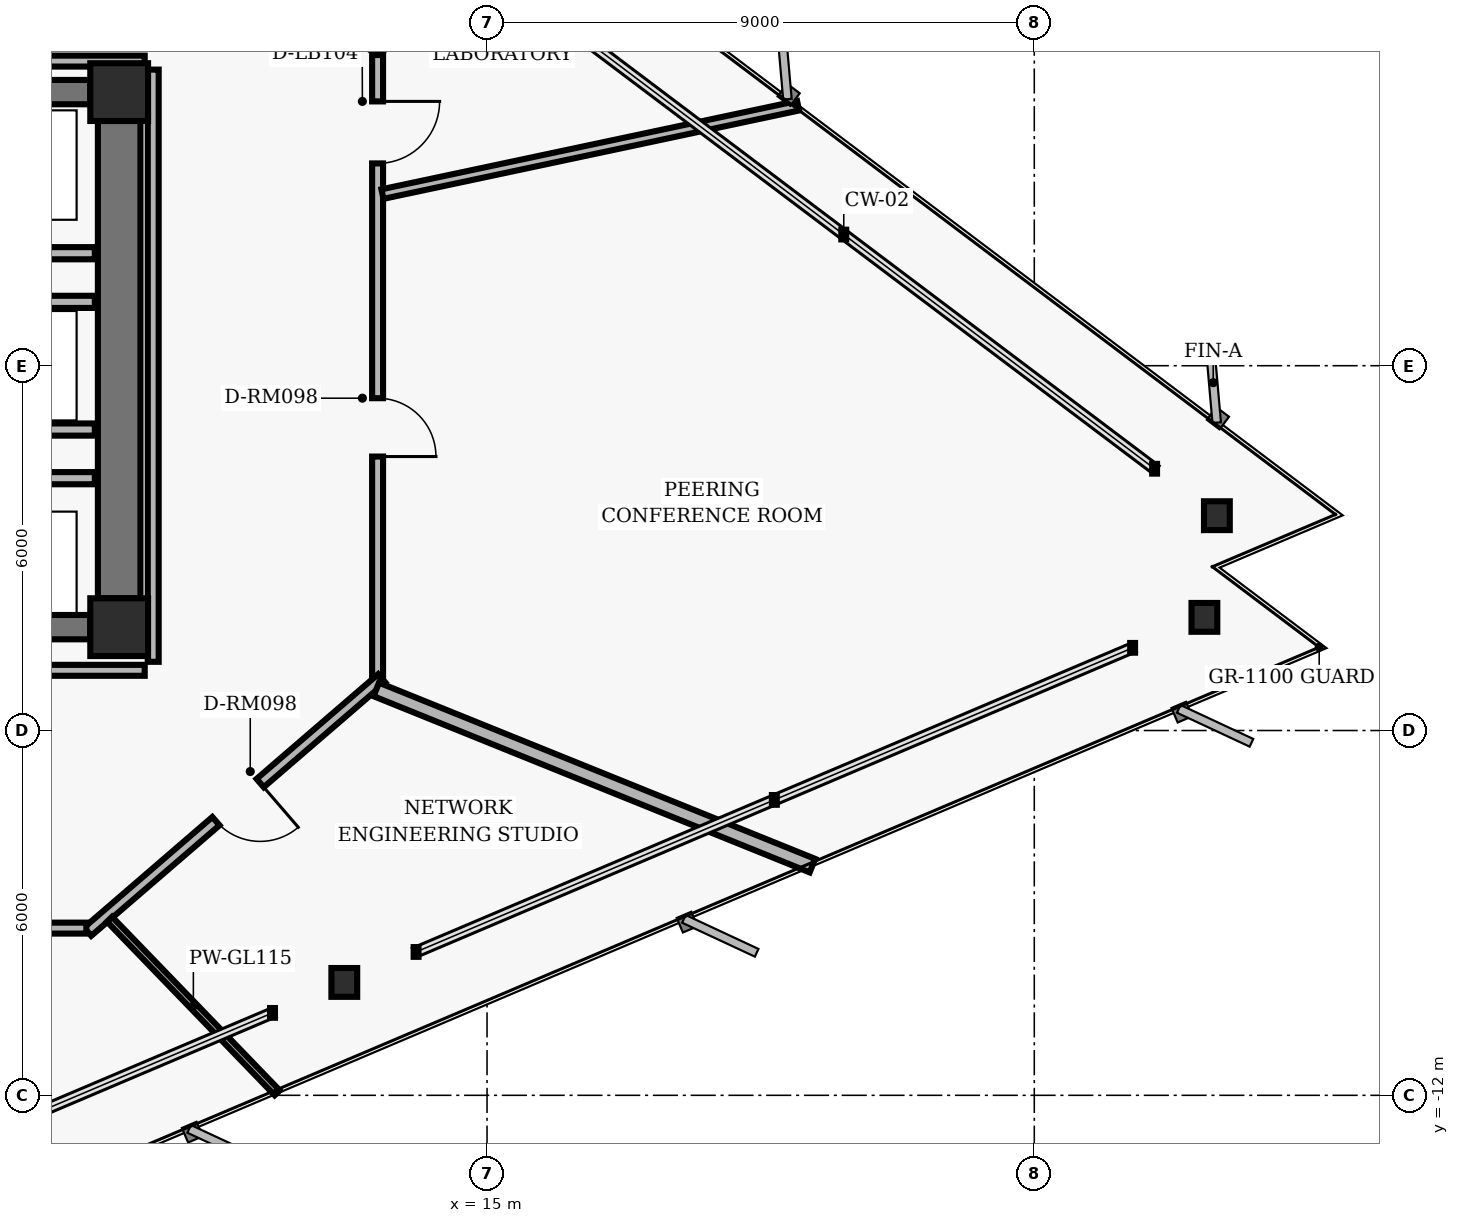
"""IFC4 building model, lengths in metres.
Left out: names, types, materials, properties, quantities, classifications, styles, units other than length and angle.
Written with IfcOpenShell. Run it as: python <this file> out.ifc"""

import sys

from ifc_helpers import new_model, si_unit, direction, frame, frame_2d, origin, origin_2d, place, context, subcontext, project, spatial, rectangle, hollow_rectangle, i_section, extrude, element, fill, save


model = new_model("IFC4")
c1 = context("Model", 3, precision=1e-05, world=origin(), true_north=direction((0.0, 1.0)))
c2 = subcontext(c1, "Body", "Model", "MODEL_VIEW")
j1 = project(units=[si_unit("LENGTHUNIT", "METRE"), si_unit("PLANEANGLEUNIT", "RADIAN")], contexts=[c1])
p1 = place(None, origin())
s1 = spatial("IfcSite", under=j1, at=p1, CompositionType="ELEMENT")
p2 = place(p1, origin())
s2 = spatial("IfcBuilding", under=s1, at=p2, CompositionType="ELEMENT")
p3 = place(p2, frame((0.0, 0.0, 56.32)))
s3 = spatial("IfcBuildingStorey", under=s2, at=p3, CompositionType="ELEMENT", Elevation=56.32)
for number, where, z_axis, x_axis in (
    (1, (8.95, 4.5, 0.0), (0.0, 0.0, 1.0), (1.0, 0.0, 0.0)),
    (2, (8.95, -4.3, 0.0), (0.0, 0.0, 1.0), (1.0, 0.0, 0.0)),
):
    element("IfcColumn", number, at=place(p3, frame(where, z_axis=z_axis, x_axis=x_axis)), inside=s3, PredefinedType="COLUMN", context=c2, shape_type="SweptSolid", body=[
        extrude(hollow_rectangle(XDim=0.95, YDim=0.95, WallThickness=0.06, InnerFilletRadius=0.02, OuterFilletRadius=0.04, at=origin_2d()), origin(), (0.0, 0.0, 1.0), 3.36),
    ])
p4 = place(p3, frame((8.95, -3.825, 0.0), z_axis=(0.0, 0.0, 1.0), x_axis=(0.0, 1.0, 0.0)))
e3 = element("IfcWall", 3, at=p4, inside=s3, PredefinedType="SHEAR", context=c2, shape_type="SweptSolid", body=[
    extrude(rectangle(XDim=7.85, YDim=0.7, at=frame_2d((3.925, 0.0))), origin(), (0.0, 0.0, 1.0), 3.098),
])
for number, where, z_axis, x_axis in (
    (4, (6.525, 4.5, 0.0), (0.0, 0.0, 1.0), (1.0, 0.0, 0.0)),
    (5, (6.525, -4.3, 0.0), (0.0, 0.0, 1.0), (1.0, 0.0, 0.0)),
):
    element("IfcWall", number, at=place(p3, frame(where, z_axis=z_axis, x_axis=x_axis)), inside=s3, PredefinedType="SHEAR", context=c2, shape_type="SweptSolid", body=[
        extrude(rectangle(XDim=1.95, YDim=0.4, at=frame_2d((0.975, 0.0))), origin(), (0.0, 0.0, 1.0), 3.098),
    ])
for number, where, z_axis, x_axis in (
    (6, (27.003, -2.467, 0.0), (0.0, 0.0, 1.0), (1.0, 0.0, 0.0)),
    (7, (12.653, -10.143, 0.0), (0.0, 0.0, 1.0), (1.0, 0.0, 0.0)),
    (8, (26.798, -4.139, 0.0), (0.0, 0.0, 1.0), (1.0, 0.0, 0.0)),
):
    element("IfcColumn", number, at=place(p3, frame(where, z_axis=z_axis, x_axis=x_axis)), inside=s3, PredefinedType="COLUMN", context=c2, shape_type="SweptSolid", body=[
        extrude(i_section(OverallWidth=0.424, OverallDepth=0.474, WebThickness=0.048, FlangeThickness=0.077, FilletRadius=0.025, at=origin_2d()), origin(), (0.0, 0.0, 1.0), 3.36),
    ])
for number, where, z_axis, x_axis in (
    (9, (6.45, -1.85, 0.0), (0.0, 0.0, 1.0), (1.0, 0.0, 0.0)),
    (10, (6.45, 1.85, 0.0), (0.0, 0.0, 1.0), (1.0, 0.0, 0.0)),
):
    element("IfcWall", number, at=place(p3, frame(where, z_axis=z_axis, x_axis=x_axis)), inside=s3, PredefinedType="PARTITIONING", context=c2, shape_type="SweptSolid", body=[
        extrude(rectangle(XDim=2.1, YDim=0.2, at=frame_2d((1.05, 0.0))), origin(), (0.0, 0.0, 1.0), 3.073),
    ])
for number, where, z_axis, x_axis in (
    (11, (6.64, -1.05, 0.0), (0.0, 0.0, 1.0), (1.0, 0.0, 0.0)),
    (12, (6.64, 1.05, 0.0), (0.0, 0.0, 1.0), (1.0, 0.0, 0.0)),
):
    element("IfcWall", number, at=place(p3, frame(where, z_axis=z_axis, x_axis=x_axis)), inside=s3, PredefinedType="PARTITIONING", context=c2, shape_type="SweptSolid", body=[
        extrude(rectangle(XDim=1.91, YDim=0.2, at=frame_2d((0.955, 0.0))), origin(), (0.0, 0.0, 1.0), 3.073),
    ])
p5 = place(p3, frame((8.567, 9.29, 0.0), z_axis=(0.0, 0.0, 1.0), x_axis=(0.749626463267, -0.66186113768, 0.0)))
e13 = element("IfcWall", 13, at=p5, inside=s3, PredefinedType="PARTITIONING", context=c2, shape_type="SweptSolid", body=[
    extrude(rectangle(XDim=6.27, YDim=0.18, at=frame_2d((3.135, 0.0))), origin(), (0.0, 0.0, 1.0), 2.587),
])
p6 = place(p5, frame((2.655, 0.0, 0.0)))
e14 = element("IfcOpeningElement", 14, at=p6, cuts=e13, PredefinedType="OPENING", context=c2, shape_type="SweptSolid", body=[
    extrude(rectangle(XDim=0.96, YDim=2.02, at=frame_2d((0.48, 1.01))), frame((0.0, 0.1, 0.0), z_axis=(0.0, -1.0, 0.0), x_axis=(1.0, 0.0, 0.0)), (0.0, 0.0, 1.0), 0.2),
])
p7 = place(p3, frame((13.2, 5.11, 0.0), z_axis=(0.0, 0.0, 1.0), x_axis=(0.0, -1.0, 0.0)))
e15 = element("IfcWall", 15, at=p7, inside=s3, PredefinedType="PARTITIONING", context=c2, shape_type="SweptSolid", body=[
    extrude(rectangle(XDim=10.22, YDim=0.18, at=frame_2d((5.11, 0.0))), origin(), (0.0, 0.0, 1.0), 3.073),
])
p8 = place(p7, frame((5.644, 0.0, 0.0)))
e16 = element("IfcOpeningElement", 16, at=p8, cuts=e15, PredefinedType="OPENING", context=c2, shape_type="SweptSolid", body=[
    extrude(rectangle(XDim=0.96, YDim=2.02, at=frame_2d((0.48, 1.01))), frame((0.0, 0.1, 0.0), z_axis=(0.0, -1.0, 0.0), x_axis=(1.0, 0.0, 0.0)), (0.0, 0.0, 1.0), 0.2),
])
p9 = place(p7, frame((0.763, 0.0, 0.0)))
e17 = element("IfcOpeningElement", 17, at=p9, cuts=e15, PredefinedType="OPENING", context=c2, shape_type="SweptSolid", body=[
    extrude(rectangle(XDim=1.02, YDim=2.02, at=frame_2d((0.51, 1.01))), frame((0.0, 0.1, 0.0), z_axis=(0.0, -1.0, 0.0), x_axis=(1.0, 0.0, 0.0)), (0.0, 0.0, 1.0), 0.2),
])
p10 = place(p3, frame((13.268, -5.141, 0.0), z_axis=(0.0, 0.0, 1.0), x_axis=(-0.757534501725, -0.65279512766, 0.0)))
e18 = element("IfcWall", 18, at=p10, inside=s3, PredefinedType="PARTITIONING", context=c2, shape_type="SweptSolid", body=[
    extrude(rectangle(XDim=6.385, YDim=0.18, at=frame_2d((3.192, 0.0))), origin(), (0.0, 0.0, 1.0), 3.073),
])
p11 = place(p10, frame((2.639, 0.0, 0.0)))
e19 = element("IfcOpeningElement", 19, at=p11, cuts=e18, PredefinedType="OPENING", context=c2, shape_type="SweptSolid", body=[
    extrude(rectangle(XDim=0.96, YDim=2.02, at=frame_2d((0.48, 1.01))), frame((0.0, 0.1, 0.0), z_axis=(0.0, -1.0, 0.0), x_axis=(1.0, 0.0, 0.0)), (0.0, 0.0, 1.0), 0.2),
])
p12 = place(p3, frame((8.41, -9.25, 0.0), z_axis=(0.0, 0.0, 1.0), x_axis=(-1.0, 0.0, 0.0)))
e20 = element("IfcWall", 20, at=p12, inside=s3, PredefinedType="PARTITIONING", context=c2, shape_type="SweptSolid", body=[
    extrude(rectangle(XDim=17.0, YDim=0.18, at=frame_2d((8.5, 0.0))), origin(), (0.0, 0.0, 1.0), 2.587),
])
p13 = place(p12, frame((5.34, 0.0, 0.0)))
e21 = element("IfcOpeningElement", 21, at=p13, cuts=e20, PredefinedType="OPENING", context=c2, shape_type="SweptSolid", body=[
    extrude(rectangle(XDim=1.02, YDim=2.02, at=frame_2d((0.51, 1.01))), frame((0.0, 0.1, 0.0), z_axis=(0.0, -1.0, 0.0), x_axis=(1.0, 0.0, 0.0)), (0.0, 0.0, 1.0), 0.2),
])
p14 = place(p3, frame((6.03, -5.01, 0.0), z_axis=(0.0, 0.0, 1.0), x_axis=(1.0, 0.0, 0.0)))
e22 = element("IfcWall", 22, at=p14, inside=s3, PredefinedType="PARTITIONING", context=c2, shape_type="SweptSolid", body=[
    extrude(rectangle(XDim=3.34, YDim=0.18, at=frame_2d((1.67, 0.0))), origin(), (0.0, 0.0, 1.0), 3.073),
])
p15 = place(p3, frame((9.51, -4.87, 0.0), z_axis=(0.0, 0.0, 1.0), x_axis=(0.0, 1.0, 0.0)))
e23 = element("IfcWall", 23, at=p15, inside=s3, PredefinedType="PARTITIONING", context=c2, shape_type="SweptSolid", body=[
    extrude(rectangle(XDim=9.74, YDim=0.18, at=frame_2d((4.87, 0.0))), origin(), (0.0, 0.0, 1.0), 3.073),
])
p16 = place(p3, frame((9.37, 5.01, 0.0), z_axis=(0.0, 0.0, 1.0), x_axis=(-1.0, 0.0, 0.0)))
e24 = element("IfcWall", 24, at=p16, inside=s3, PredefinedType="PARTITIONING", context=c2, shape_type="SweptSolid", body=[
    extrude(rectangle(XDim=2.808, YDim=0.18, at=frame_2d((1.404, 0.0))), origin(), (0.0, 0.0, 1.0), 3.073),
])
p17 = place(p3, frame((8.792, -9.104, 0.0), z_axis=(0.0, 0.0, 1.0), x_axis=(0.694664773763, -0.719333616685, 0.0)))
e25 = element("IfcWall", 25, at=p17, inside=s3, PredefinedType="MOVABLE", context=c2, shape_type="SweptSolid", body=[
    extrude(rectangle(XDim=3.969, YDim=0.115, at=frame_2d((1.984, 0.0))), origin(), (0.0, 0.0, 1.0), 3.073),
])
p18 = place(p3, frame((13.178, -5.324, 0.0), z_axis=(0.0, 0.0, 1.0), x_axis=(0.927191467136, -0.374587751094, 0.0)))
e26 = element("IfcWall", 26, at=p18, inside=s3, PredefinedType="PARTITIONING", context=c2, shape_type="SweptSolid", body=[
    extrude(rectangle(XDim=7.736, YDim=0.24, at=frame_2d((3.868, 0.0))), origin(), (0.0, 0.0, 1.0), 3.073),
])
p19 = place(p3, frame((13.28, 2.823, 0.0), z_axis=(0.0, 0.0, 1.0), x_axis=(0.978150237712, 0.207899284425, 0.0)))
e27 = element("IfcWall", 27, at=p19, inside=s3, PredefinedType="PARTITIONING", context=c2, shape_type="SweptSolid", body=[
    extrude(rectangle(XDim=6.988, YDim=0.16, at=frame_2d((3.494, 0.0))), origin(), (0.0, 0.0, 1.0), 3.073),
])
p20 = place(p11, origin())
e28 = element("IfcDoor", 28, at=p20, inside=s3, OperationType="SINGLE_SWING_LEFT", PredefinedType="DOOR", context=c2, shape_type="SweptSolid", body=[
    extrude(rectangle(XDim=0.96, YDim=2.02, at=frame_2d((0.48, 1.01))), frame((0.0, 0.025, 0.0), z_axis=(0.0, -1.0, 0.0), x_axis=(1.0, 0.0, 0.0)), (0.0, 0.0, 1.0), 0.05),
])
fill(e19, e28)
p21 = place(p8, origin())
e29 = element("IfcDoor", 29, at=p21, inside=s3, OperationType="SINGLE_SWING_RIGHT", PredefinedType="DOOR", context=c2, shape_type="SweptSolid", body=[
    extrude(rectangle(XDim=0.96, YDim=2.02, at=frame_2d((0.48, 1.01))), frame((0.0, 0.025, 0.0), z_axis=(0.0, -1.0, 0.0), x_axis=(1.0, 0.0, 0.0)), (0.0, 0.0, 1.0), 0.05),
])
fill(e16, e29)
p22 = place(p9, origin())
e30 = element("IfcDoor", 30, at=p22, inside=s3, OperationType="SINGLE_SWING_LEFT", PredefinedType="DOOR", context=c2, shape_type="SweptSolid", body=[
    extrude(rectangle(XDim=1.02, YDim=2.02, at=frame_2d((0.51, 1.01))), frame((0.0, 0.025, 0.0), z_axis=(0.0, -1.0, 0.0), x_axis=(1.0, 0.0, 0.0)), (0.0, 0.0, 1.0), 0.05),
])
fill(e17, e30)
save(model, sys.argv[1])
